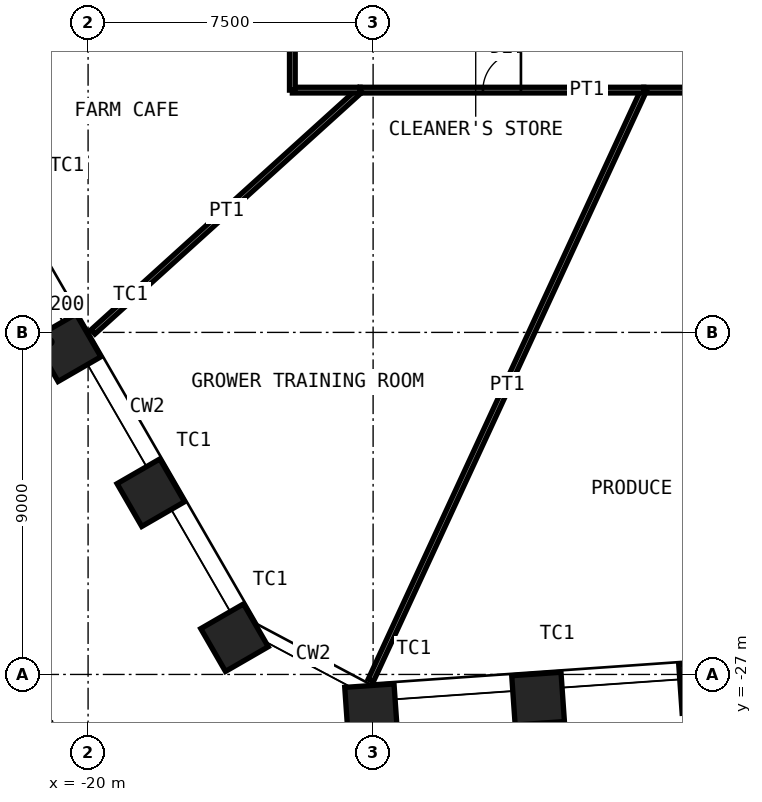
"""IFC4 building model, lengths in metres.
Left out: names, types, materials, properties, quantities, classifications, styles, units other than length and angle.
Written with IfcOpenShell. Run it as: python <this file> out.ifc"""

import sys

from ifc_helpers import new_model, si_unit, direction, frame, frame_2d, origin, origin_2d, place, context, subcontext, project, spatial, rectangle, hollow_rectangle, extrude, element, fill, save


model = new_model("IFC4")
c1 = context("Model", 3, precision=1e-05, world=origin(), true_north=direction((0.0, 1.0)))
c2 = subcontext(c1, "Body", "Model", "MODEL_VIEW")
j1 = project(units=[si_unit("LENGTHUNIT", "METRE"), si_unit("PLANEANGLEUNIT", "RADIAN")], contexts=[c1])
p1 = place(None, origin())
s1 = spatial("IfcSite", under=j1, at=p1, CompositionType="ELEMENT")
p2 = place(p1, origin())
s2 = spatial("IfcBuilding", under=s1, at=p2, CompositionType="ELEMENT")
p3 = place(p2, frame((0.0, 0.0, 17.0)))
s3 = spatial("IfcBuildingStorey", under=s2, at=p3, CompositionType="ELEMENT", Elevation=17.0)
for number, where, z_axis, x_axis in (
    (1, (-3.765, -27.329, 0.0), (0.0, 0.0, 1.0), (0.998, 0.07, 0.0)),
    (2, (-8.159, -27.636, 0.0), (0.0, 0.0, 1.0), (0.998, 0.07, 0.0)),
    (3, (-12.553, -27.944, 0.0), (0.0, 0.0, 1.0), (0.998, 0.07, 0.0)),
    (4, (-16.147, -26.033, 0.0), (0.0, 0.0, 1.0), (0.5, -0.866, 0.0)),
    (5, (-18.349, -22.218, 0.0), (0.0, 0.0, 1.0), (0.5, -0.866, 0.0)),
    (6, (-20.552, -18.404, 0.0), (0.0, 0.0, 1.0), (0.5, -0.866, 0.0)),
):
    element("IfcColumn", number, at=place(p3, frame(where, z_axis=z_axis, x_axis=x_axis)), inside=s3, PredefinedType="COLUMN", context=c2, shape_type="SweptSolid", body=[
        extrude(hollow_rectangle(XDim=1.3, YDim=1.3, WallThickness=0.1, at=origin_2d()), origin(), (0.0, 0.0, 1.0), 5.0),
    ])
p4 = place(p3, frame((0.256, -11.625, 0.0), z_axis=(0.0, 0.0, 1.0), x_axis=(-1.0, 0.0, 0.0)))
e7 = element("IfcWall", 7, at=p4, inside=s3, PredefinedType="PARTITIONING", context=c2, shape_type="SweptSolid", body=[
    extrude(rectangle(XDim=5.633, YDim=0.15, at=frame_2d((2.816, 0.0))), origin(), (0.0, 0.0, 1.0), 4.8),
])
p5 = place(p4, frame((1.917, 0.0, 0.0)))
e8 = element("IfcOpeningElement", 8, at=p5, cuts=e7, PredefinedType="OPENING", context=c2, shape_type="SweptSolid", body=[
    extrude(rectangle(XDim=1.8, YDim=2.4, at=frame_2d((0.9, 1.2))), frame((0.0, 0.085, 0.0), z_axis=(0.0, -1.0, 0.0), x_axis=(1.0, 0.0, 0.0)), (0.0, 0.0, 1.0), 0.17),
])
p6 = place(p3, frame((-12.56, -27.155, 0.0), z_axis=(0.0, 0.0, 1.0), x_axis=(0.419799104875, 0.907617051154, 0.0)))
e9 = element("IfcWall", 9, at=p6, inside=s3, PredefinedType="PARTITIONING", context=c2, shape_type="SweptSolid", body=[
    extrude(rectangle(XDim=17.11, YDim=0.15, at=frame_2d((8.555, 0.0))), origin(), (0.0, 0.0, 1.0), 3.7),
])
p7 = place(p3, frame((-5.377, -11.625, 0.0), z_axis=(0.0, 0.0, 1.0), x_axis=(-1.0, 0.0, 0.0)))
e10 = element("IfcWall", 10, at=p7, inside=s3, PredefinedType="PARTITIONING", context=c2, shape_type="SweptSolid", body=[
    extrude(rectangle(XDim=7.466, YDim=0.15, at=frame_2d((3.733, 0.0))), origin(), (0.0, 0.0, 1.0), 4.8),
])
p8 = place(p7, frame((3.233, 0.0, 0.0)))
e11 = element("IfcOpeningElement", 11, at=p8, cuts=e10, PredefinedType="OPENING", context=c2, shape_type="SweptSolid", body=[
    extrude(rectangle(XDim=1.0, YDim=2.4, at=frame_2d((0.5, 1.2))), frame((0.0, 0.085, 0.0), z_axis=(0.0, -1.0, 0.0), x_axis=(1.0, 0.0, 0.0)), (0.0, 0.0, 1.0), 0.17),
])
p9 = place(p3, frame((-19.871, -17.987, 0.0), z_axis=(0.0, 0.0, 1.0), x_axis=(0.741386887315, 0.671077851905, 0.0)))
e12 = element("IfcWall", 12, at=p9, inside=s3, PredefinedType="PARTITIONING", context=c2, shape_type="SweptSolid", body=[
    extrude(rectangle(XDim=9.48, YDim=0.15, at=frame_2d((4.74, 0.0))), origin(), (0.0, 0.0, 1.0), 3.7),
])
p10 = place(p3, frame((-12.843, -11.625, 0.0), z_axis=(0.0, 0.0, 1.0), x_axis=(-1.0, 0.0, 0.0)))
e13 = element("IfcWall", 13, at=p10, inside=s3, PredefinedType="PARTITIONING", context=c2, shape_type="SweptSolid", body=[
    extrude(rectangle(XDim=1.782, YDim=0.15, at=frame_2d((0.891, 0.0))), origin(), (0.0, 0.0, 1.0), 4.8),
])
p11 = place(p3, frame((-14.625, -11.625, 0.0), z_axis=(0.0, 0.0, 1.0), x_axis=(0.0, 1.0, 0.0)))
e14 = element("IfcWall", 14, at=p11, inside=s3, PredefinedType="PARTITIONING", context=c2, shape_type="SweptSolid", body=[
    extrude(rectangle(XDim=5.364, YDim=0.15, at=frame_2d((2.682, 0.0))), origin(), (0.0, 0.0, 1.0), 4.8),
])
p12 = place(p11, frame((2.182, 0.0, 0.0)))
e15 = element("IfcOpeningElement", 15, at=p12, cuts=e14, PredefinedType="OPENING", context=c2, shape_type="SweptSolid", body=[
    extrude(rectangle(XDim=1.0, YDim=2.4, at=frame_2d((0.5, 1.2))), frame((0.0, 0.085, 0.0), z_axis=(0.0, -1.0, 0.0), x_axis=(1.0, 0.0, 0.0)), (0.0, 0.0, 1.0), 0.17),
])
p13 = place(p8, origin())
e16 = element("IfcDoor", 16, at=p13, inside=s3, OperationType="SINGLE_SWING_LEFT", PredefinedType="DOOR", context=c2, shape_type="SweptSolid", body=[
    extrude(rectangle(XDim=1.0, YDim=2.4, at=frame_2d((0.5, 1.2))), frame((0.0, 0.025, 0.0), z_axis=(0.0, -1.0, 0.0), x_axis=(1.0, 0.0, 0.0)), (0.0, 0.0, 1.0), 0.05),
])
fill(e11, e16)
save(model, sys.argv[1])
